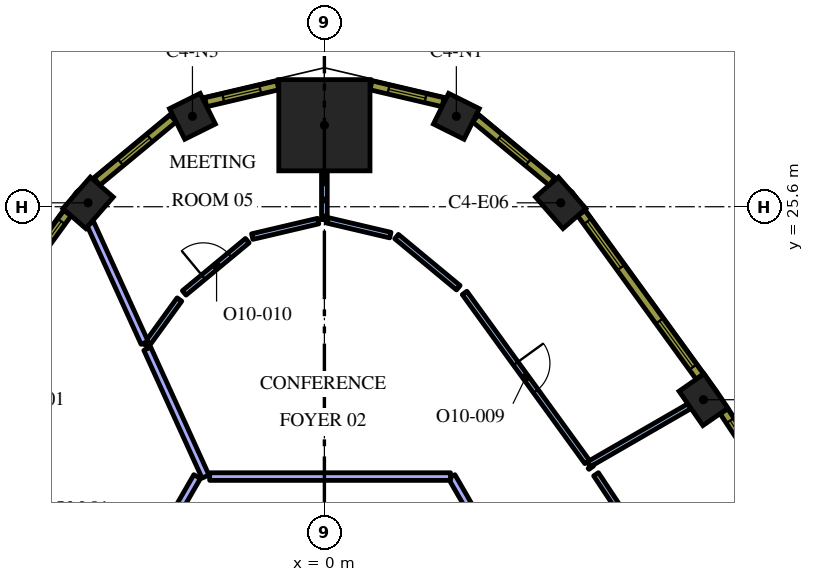
"""IFC4 building model, lengths in metres.
Left out: names, types, materials, properties, quantities, classifications, styles, units other than length and angle.
Written with IfcOpenShell. Run it as: python <this file> out.ifc"""

import sys

from ifc_helpers import new_model, si_unit, direction, frame, frame_2d, origin, origin_2d, place, context, subcontext, project, spatial, rectangle, extrude, element, fill, save


model = new_model("IFC4")
c1 = context("Model", 3, precision=1e-05, world=origin(), true_north=direction((0.0, 1.0)))
c2 = subcontext(c1, "Body", "Model", "MODEL_VIEW")
j1 = project(units=[si_unit("LENGTHUNIT", "METRE"), si_unit("PLANEANGLEUNIT", "RADIAN")], contexts=[c1])
p1 = place(None, origin())
s1 = spatial("IfcSite", under=j1, at=p1, CompositionType="ELEMENT")
p2 = place(p1, origin())
s2 = spatial("IfcBuilding", under=s1, at=p2, CompositionType="ELEMENT")
p3 = place(p2, frame((0.0, 0.0, 252.0)))
s3 = spatial("IfcBuildingStorey", under=s2, at=p3, CompositionType="ELEMENT", Elevation=252.0)
p4 = place(p3, frame((0.0, 27.744, 0.0), z_axis=(0.0, 0.0, 1.0), x_axis=(0.0, 1.0, 0.0)))
e1 = element("IfcColumn", 1, at=p4, inside=s3, PredefinedType="COLUMN", context=c2, shape_type="SweptSolid", body=[
    extrude(rectangle(XDim=2.4, YDim=2.4, at=origin_2d()), origin(), (0.0, 0.0, 1.0), 4.2),
])
for number, where, z_axis, x_axis in (
    (2, (9.975, 20.522, 0.0), (0.0, 0.0, 1.0), (-0.57, 0.822, 0.0)),
    (3, (6.219, 25.703, 0.0), (0.0, 0.0, 1.0), (-0.657, 0.754, 0.0)),
):
    element("IfcColumn", number, at=place(p3, frame(where, z_axis=z_axis, x_axis=x_axis)), inside=s3, PredefinedType="COLUMN", context=c2, shape_type="SweptSolid", body=[
        extrude(rectangle(XDim=1.1, YDim=0.8, at=origin_2d()), origin(), (0.0, 0.0, 1.0), 4.2),
    ])
for number, where, z_axis, x_axis in (
    (4, (3.472, 27.979, 0.0), (0.0, 0.0, 1.0), (-0.895, 0.445, 0.0)),
    (5, (-3.472, 27.979, 0.0), (0.0, 0.0, 1.0), (-0.895, -0.445, 0.0)),
):
    element("IfcColumn", number, at=place(p3, frame(where, z_axis=z_axis, x_axis=x_axis)), inside=s3, PredefinedType="COLUMN", context=c2, shape_type="SweptSolid", body=[
        extrude(rectangle(XDim=0.9, YDim=0.9, at=origin_2d()), origin(), (0.0, 0.0, 1.0), 4.2),
    ])
p5 = place(p3, frame((-6.219, 25.703, 0.0), z_axis=(0.0, 0.0, 1.0), x_axis=(-0.657250291216, -0.753672378886, 0.0)))
e6 = element("IfcColumn", 6, at=p5, inside=s3, PredefinedType="COLUMN", context=c2, shape_type="SweptSolid", body=[
    extrude(rectangle(XDim=1.1, YDim=0.8, at=origin_2d()), origin(), (0.0, 0.0, 1.0), 4.2),
])
p6 = place(p3, frame((6.958, 18.823, 0.0), z_axis=(0.0, 0.0, 1.0), x_axis=(0.866008752819, 0.500028839209, 0.0)))
e7 = element("IfcWall", 7, at=p6, inside=s3, PredefinedType="PARTITIONING", context=c2, shape_type="SweptSolid", body=[
    extrude(rectangle(XDim=3.058, YDim=0.15, at=frame_2d((1.529, 0.0))), origin(), (0.0, 0.0, 1.0), 3.4),
])
p7 = place(p3, frame((10.489, 13.526, 0.0), z_axis=(0.0, 0.0, 1.0), x_axis=(-0.552890023891, 0.833254235802, 0.0)))
e8 = element("IfcWall", 8, at=p7, inside=s3, PredefinedType="PARTITIONING", context=c2, shape_type="SweptSolid", body=[
    extrude(rectangle(XDim=6.042, YDim=0.15, at=frame_2d((3.021, 0.0))), origin(), (0.0, 0.0, 1.0), 3.4),
])
p8 = place(p3, frame((7.022, 18.734, 0.0), z_axis=(0.0, 0.0, 1.0), x_axis=(-0.585233084123, 0.810865116556, 0.0)))
e9 = element("IfcWall", 9, at=p8, inside=s3, PredefinedType="PARTITIONING", context=c2, shape_type="SweptSolid", body=[
    extrude(rectangle(XDim=0.035, YDim=0.15, at=frame_2d((0.017, 0.0))), origin(), (0.0, 0.0, 1.0), 3.4),
])
p9 = place(p3, frame((0.0, 25.261, 0.0), z_axis=(0.0, 0.0, 1.0), x_axis=(0.0, 1.0, 0.0)))
e10 = element("IfcWall", 10, at=p9, inside=s3, PredefinedType="PARTITIONING", context=c2, shape_type="SweptSolid", body=[
    extrude(rectangle(XDim=1.283, YDim=0.15, at=frame_2d((0.642, 0.0))), origin(), (0.0, 0.0, 1.0), 3.4),
])
p10 = place(p3, frame((3.689, 23.332, 0.0), z_axis=(0.0, 0.0, 1.0), x_axis=(0.587008354495, -0.809580874128, 0.0)))
e11 = element("IfcWall", 11, at=p10, inside=s3, PredefinedType="PARTITIONING", context=c2, shape_type="SweptSolid", body=[
    extrude(rectangle(XDim=5.493, YDim=0.15, at=frame_2d((2.747, 0.0))), origin(), (0.0, 0.0, 1.0), 3.4),
])
p11 = place(p10, frame((2.294, 0.0, 0.0)))
e12 = element("IfcOpeningElement", 12, at=p11, cuts=e11, PredefinedType="OPENING", context=c2, shape_type="SweptSolid", body=[
    extrude(rectangle(XDim=0.9, YDim=2.1, at=frame_2d((0.45, 1.05))), frame((0.0, 0.085, 0.0), z_axis=(0.0, -1.0, 0.0), x_axis=(1.0, 0.0, 0.0)), (0.0, 0.0, 1.0), 0.17),
])
p12 = place(p3, frame((3.524, 23.469, 0.0), z_axis=(0.0, 0.0, 1.0), x_axis=(-0.76998257631, 0.638064912199, 0.0)))
e13 = element("IfcWall", 13, at=p12, inside=s3, PredefinedType="PARTITIONING", context=c2, shape_type="SweptSolid", body=[
    extrude(rectangle(XDim=2.11, YDim=0.15, at=frame_2d((1.055, 0.0))), origin(), (0.0, 0.0, 1.0), 3.4),
])
p13 = place(p3, frame((1.735, 24.854, 0.0), z_axis=(0.0, 0.0, 1.0), x_axis=(-0.973544695081, 0.228496666669, 0.0)))
e14 = element("IfcWall", 14, at=p13, inside=s3, PredefinedType="PARTITIONING", context=c2, shape_type="SweptSolid", body=[
    extrude(rectangle(XDim=1.705, YDim=0.15, at=frame_2d((0.853, 0.0))), origin(), (0.0, 0.0, 1.0), 3.4),
])
p14 = place(p3, frame((-0.164, 25.222, 0.0), z_axis=(0.0, 0.0, 1.0), x_axis=(-0.973485388336, -0.228749204801, 0.0)))
e15 = element("IfcWall", 15, at=p14, inside=s3, PredefinedType="PARTITIONING", context=c2, shape_type="SweptSolid", body=[
    extrude(rectangle(XDim=1.782, YDim=0.15, at=frame_2d((0.891, 0.0))), origin(), (0.0, 0.0, 1.0), 3.4),
])
p15 = place(p3, frame((-3.689, 23.332, 0.0), z_axis=(0.0, 0.0, 1.0), x_axis=(0.769991356208, 0.63805431694, 0.0)))
e16 = element("IfcWall", 16, at=p15, inside=s3, PredefinedType="PARTITIONING", context=c2, shape_type="SweptSolid", body=[
    extrude(rectangle(XDim=2.156, YDim=0.15, at=frame_2d((1.078, 0.0))), origin(), (0.0, 0.0, 1.0), 3.4),
])
p16 = place(p15, frame((0.656, 0.0, 0.0)))
e17 = element("IfcOpeningElement", 17, at=p16, cuts=e16, PredefinedType="OPENING", context=c2, shape_type="SweptSolid", body=[
    extrude(rectangle(XDim=0.9, YDim=2.1, at=frame_2d((0.45, 1.05))), frame((0.0, 0.085, 0.0), z_axis=(0.0, -1.0, 0.0), x_axis=(1.0, 0.0, 0.0)), (0.0, 0.0, 1.0), 0.17),
])
p17 = place(p3, frame((-3.814, 23.158, 0.0), z_axis=(0.0, 0.0, 1.0), x_axis=(-0.58694359924, -0.809627822713, 0.0)))
e18 = element("IfcWall", 18, at=p17, inside=s3, PredefinedType="PARTITIONING", context=c2, shape_type="SweptSolid", body=[
    extrude(rectangle(XDim=1.502, YDim=0.15, at=frame_2d((0.751, 0.0))), origin(), (0.0, 0.0, 1.0), 3.4),
])
p18 = place(p3, frame((-4.732, 22.021, 0.0), z_axis=(0.0, 0.0, 1.0), x_axis=(-0.414330796432, 0.910126359979, 0.0)))
e19 = element("IfcWall", 19, at=p18, inside=s3, PredefinedType="PARTITIONING", context=c2, shape_type="SweptSolid", body=[
    extrude(rectangle(XDim=3.449, YDim=0.2, at=frame_2d((1.725, 0.0))), origin(), (0.0, 0.0, 1.0), 3.4),
])
p19 = place(p3, frame((-3.129, 18.5, 0.0), z_axis=(0.0, 0.0, 1.0), x_axis=(-0.414340331393, 0.910122019172, 0.0)))
e20 = element("IfcWall", 20, at=p19, inside=s3, PredefinedType="PARTITIONING", context=c2, shape_type="SweptSolid", body=[
    extrude(rectangle(XDim=3.696, YDim=0.2, at=frame_2d((1.848, 0.0))), origin(), (0.0, 0.0, 1.0), 3.4),
])
p20 = place(p3, frame((7.507, 11.297, 0.0), z_axis=(0.0, 0.0, 1.0), x_axis=(-0.499987561347, 0.866032585125, 0.0)))
e21 = element("IfcWall", 21, at=p20, inside=s3, PredefinedType="PARTITIONING", context=c2, shape_type="SweptSolid", body=[
    extrude(rectangle(XDim=8.317, YDim=0.2, at=frame_2d((4.159, 0.0))), origin(), (0.0, 0.0, 1.0), 3.4),
])
p21 = place(p20, frame((3.7, 0.0, 0.0)))
e22 = element("IfcOpeningElement", 22, at=p21, cuts=e21, PredefinedType="OPENING", context=c2, shape_type="SweptSolid", body=[
    extrude(rectangle(XDim=1.0, YDim=2.1, at=frame_2d((0.5, 1.05))), frame((0.0, 0.11, 0.0), z_axis=(0.0, -1.0, 0.0), x_axis=(1.0, 0.0, 0.0)), (0.0, 0.0, 1.0), 0.22),
])
p22 = place(p3, frame((3.319, 18.5, 0.0), z_axis=(0.0, 0.0, 1.0), x_axis=(-1.0, 0.0, 0.0)))
e23 = element("IfcWall", 23, at=p22, inside=s3, PredefinedType="PARTITIONING", context=c2, shape_type="SweptSolid", body=[
    extrude(rectangle(XDim=6.338, YDim=0.2, at=frame_2d((3.169, 0.0))), origin(), (0.0, 0.0, 1.0), 3.4),
])
p23 = place(p3, frame((-3.349, 18.5, 0.0), z_axis=(0.0, 0.0, 1.0), x_axis=(-0.499987561347, -0.866032585125, 0.0)))
e24 = element("IfcWall", 24, at=p23, inside=s3, PredefinedType="PARTITIONING", context=c2, shape_type="SweptSolid", body=[
    extrude(rectangle(XDim=8.317, YDim=0.2, at=frame_2d((4.159, 0.0))), origin(), (0.0, 0.0, 1.0), 3.4),
])
p24 = place(p3, frame((13.442, 15.803, 0.0), z_axis=(0.0, 0.0, 1.0), x_axis=(-0.552901821755, 0.833246407433, 0.0)))
e25 = element("IfcWall", 25, at=p24, inside=s3, PredefinedType="SOLIDWALL", context=c2, shape_type="SweptSolid", body=[
    extrude(rectangle(XDim=5.298, YDim=0.24, at=frame_2d((2.649, 0.0))), origin(), (0.0, 0.0, 1.0), 3.9),
])
p25 = place(p24, frame((0.295, 0.0, 0.9)))
e26 = element("IfcOpeningElement", 26, at=p25, cuts=e25, PredefinedType="OPENING", context=c2, shape_type="SweptSolid", body=[
    extrude(rectangle(XDim=1.5, YDim=2.55, at=frame_2d((0.75, 1.275))), frame((0.0, 0.13, 0.0), z_axis=(0.0, -1.0, 0.0), x_axis=(1.0, 0.0, 0.0)), (0.0, 0.0, 1.0), 0.26),
])
p26 = place(p24, frame((3.504, 0.0, 0.9)))
e27 = element("IfcOpeningElement", 27, at=p26, cuts=e25, PredefinedType="OPENING", context=c2, shape_type="SweptSolid", body=[
    extrude(rectangle(XDim=1.5, YDim=2.55, at=frame_2d((0.75, 1.275))), frame((0.0, 0.13, 0.0), z_axis=(0.0, -1.0, 0.0), x_axis=(1.0, 0.0, 0.0)), (0.0, 0.0, 1.0), 0.26),
])
p27 = place(p3, frame((9.878, 21.132, 0.0), z_axis=(0.0, 0.0, 1.0), x_axis=(-0.586998456641, 0.80958805074, 0.0)))
e28 = element("IfcWall", 28, at=p27, inside=s3, PredefinedType="SOLIDWALL", context=c2, shape_type="SweptSolid", body=[
    extrude(rectangle(XDim=5.311, YDim=0.24, at=frame_2d((2.655, 0.0))), origin(), (0.0, 0.0, 1.0), 3.9),
])
p28 = place(p27, frame((0.306, 0.0, 0.9)))
e29 = element("IfcOpeningElement", 29, at=p28, cuts=e28, PredefinedType="OPENING", context=c2, shape_type="SweptSolid", body=[
    extrude(rectangle(XDim=1.5, YDim=2.55, at=frame_2d((0.75, 1.275))), frame((0.0, 0.13, 0.0), z_axis=(0.0, -1.0, 0.0), x_axis=(1.0, 0.0, 0.0)), (0.0, 0.0, 1.0), 0.26),
])
p29 = place(p27, frame((3.539, 0.0, 0.9)))
e30 = element("IfcOpeningElement", 30, at=p29, cuts=e28, PredefinedType="OPENING", context=c2, shape_type="SweptSolid", body=[
    extrude(rectangle(XDim=1.5, YDim=2.55, at=frame_2d((0.75, 1.275))), frame((0.0, 0.13, 0.0), z_axis=(0.0, -1.0, 0.0), x_axis=(1.0, 0.0, 0.0)), (0.0, 0.0, 1.0), 0.26),
])
p30 = place(p3, frame((5.987, 26.259, 0.0), z_axis=(0.0, 0.0, 1.0), x_axis=(-0.769990037733, 0.638055908045, 0.0)))
e31 = element("IfcWall", 31, at=p30, inside=s3, PredefinedType="SOLIDWALL", context=c2, shape_type="SweptSolid", body=[
    extrude(rectangle(XDim=2.609, YDim=0.24, at=frame_2d((1.305, 0.0))), origin(), (0.0, 0.0, 1.0), 3.9),
])
p31 = place(p30, frame((0.805, 0.0, 0.9)))
e32 = element("IfcOpeningElement", 32, at=p31, cuts=e31, PredefinedType="OPENING", context=c2, shape_type="SweptSolid", body=[
    extrude(rectangle(XDim=1.0, YDim=2.55, at=frame_2d((0.5, 1.275))), frame((0.0, 0.13, 0.0), z_axis=(0.0, -1.0, 0.0), x_axis=(1.0, 0.0, 0.0)), (0.0, 0.0, 1.0), 0.26),
])
p32 = place(p3, frame((3.123, 28.349, 0.0), z_axis=(0.0, 0.0, 1.0), x_axis=(-0.973515706272, 0.228620142686, 0.0)))
e33 = element("IfcWall", 33, at=p32, inside=s3, PredefinedType="SOLIDWALL", context=c2, shape_type="SweptSolid", body=[
    extrude(rectangle(XDim=1.948, YDim=0.24, at=frame_2d((0.974, 0.0))), origin(), (0.0, 0.0, 1.0), 3.9),
])
p33 = place(p32, frame((0.474, 0.0, 0.9)))
e34 = element("IfcOpeningElement", 34, at=p33, cuts=e33, PredefinedType="OPENING", context=c2, shape_type="SweptSolid", body=[
    extrude(rectangle(XDim=1.0, YDim=2.55, at=frame_2d((0.5, 1.275))), frame((0.0, 0.13, 0.0), z_axis=(0.0, -1.0, 0.0), x_axis=(1.0, 0.0, 0.0)), (0.0, 0.0, 1.0), 0.26),
])
p34 = place(p3, frame((-1.227, 28.794, 0.0), z_axis=(0.0, 0.0, 1.0), x_axis=(-0.973515706272, -0.228620142686, 0.0)))
e35 = element("IfcWall", 35, at=p34, inside=s3, PredefinedType="SOLIDWALL", context=c2, shape_type="SweptSolid", body=[
    extrude(rectangle(XDim=1.948, YDim=0.24, at=frame_2d((0.974, 0.0))), origin(), (0.0, 0.0, 1.0), 3.9),
])
p35 = place(p34, frame((0.474, 0.0, 0.9)))
e36 = element("IfcOpeningElement", 36, at=p35, cuts=e35, PredefinedType="OPENING", context=c2, shape_type="SweptSolid", body=[
    extrude(rectangle(XDim=1.0, YDim=2.55, at=frame_2d((0.5, 1.275))), frame((0.0, 0.13, 0.0), z_axis=(0.0, -1.0, 0.0), x_axis=(1.0, 0.0, 0.0)), (0.0, 0.0, 1.0), 0.26),
])
p36 = place(p3, frame((-3.978, 27.924, 0.0), z_axis=(0.0, 0.0, 1.0), x_axis=(-0.769990037733, -0.638055908045, 0.0)))
e37 = element("IfcWall", 37, at=p36, inside=s3, PredefinedType="SOLIDWALL", context=c2, shape_type="SweptSolid", body=[
    extrude(rectangle(XDim=2.609, YDim=0.24, at=frame_2d((1.305, 0.0))), origin(), (0.0, 0.0, 1.0), 3.9),
])
p37 = place(p36, frame((0.805, 0.0, 0.9)))
e38 = element("IfcOpeningElement", 38, at=p37, cuts=e37, PredefinedType="OPENING", context=c2, shape_type="SweptSolid", body=[
    extrude(rectangle(XDim=1.0, YDim=2.55, at=frame_2d((0.5, 1.275))), frame((0.0, 0.13, 0.0), z_axis=(0.0, -1.0, 0.0), x_axis=(1.0, 0.0, 0.0)), (0.0, 0.0, 1.0), 0.26),
])
p38 = place(p3, frame((-6.761, 25.432, 0.0), z_axis=(0.0, 0.0, 1.0), x_axis=(-0.586998456641, -0.80958805074, 0.0)))
e39 = element("IfcWall", 39, at=p38, inside=s3, PredefinedType="SOLIDWALL", context=c2, shape_type="SweptSolid", body=[
    extrude(rectangle(XDim=5.311, YDim=0.24, at=frame_2d((2.655, 0.0))), origin(), (0.0, 0.0, 1.0), 3.9),
])
p39 = place(p38, frame((0.271, 0.0, 0.9)))
e40 = element("IfcOpeningElement", 40, at=p39, cuts=e39, PredefinedType="OPENING", context=c2, shape_type="SweptSolid", body=[
    extrude(rectangle(XDim=1.5, YDim=2.55, at=frame_2d((0.75, 1.275))), frame((0.0, 0.13, 0.0), z_axis=(0.0, -1.0, 0.0), x_axis=(1.0, 0.0, 0.0)), (0.0, 0.0, 1.0), 0.26),
])
p40 = place(p38, frame((3.504, 0.0, 0.9)))
e41 = element("IfcOpeningElement", 41, at=p40, cuts=e39, PredefinedType="OPENING", context=c2, shape_type="SweptSolid", body=[
    extrude(rectangle(XDim=1.5, YDim=2.55, at=frame_2d((0.75, 1.275))), frame((0.0, 0.13, 0.0), z_axis=(0.0, -1.0, 0.0), x_axis=(1.0, 0.0, 0.0)), (0.0, 0.0, 1.0), 0.26),
])
p41 = place(p11, origin())
e42 = element("IfcDoor", 42, at=p41, inside=s3, OperationType="SINGLE_SWING_LEFT", PredefinedType="DOOR", context=c2, shape_type="SweptSolid", body=[
    extrude(rectangle(XDim=0.9, YDim=2.1, at=frame_2d((0.45, 1.05))), frame((0.0, 0.025, 0.0), z_axis=(0.0, -1.0, 0.0), x_axis=(1.0, 0.0, 0.0)), (0.0, 0.0, 1.0), 0.05),
])
fill(e12, e42)
p42 = place(p16, origin())
e43 = element("IfcDoor", 43, at=p42, inside=s3, OperationType="SINGLE_SWING_RIGHT", PredefinedType="DOOR", context=c2, shape_type="SweptSolid", body=[
    extrude(rectangle(XDim=0.9, YDim=2.1, at=frame_2d((0.45, 1.05))), frame((0.0, 0.025, 0.0), z_axis=(0.0, -1.0, 0.0), x_axis=(1.0, 0.0, 0.0)), (0.0, 0.0, 1.0), 0.05),
])
fill(e17, e43)
p43 = place(p26, origin())
e44 = element("IfcWindow", 44, at=p43, inside=s3, PartitioningType="SINGLE_PANEL", PredefinedType="WINDOW", context=c2, shape_type="SweptSolid", body=[
    extrude(rectangle(XDim=1.5, YDim=2.55, at=frame_2d((0.75, 1.275))), frame((0.0, 0.04, 0.0), z_axis=(0.0, -1.0, 0.0), x_axis=(1.0, 0.0, 0.0)), (0.0, 0.0, 1.0), 0.06),
])
fill(e27, e44)
p44 = place(p28, origin())
e45 = element("IfcWindow", 45, at=p44, inside=s3, PartitioningType="SINGLE_PANEL", PredefinedType="WINDOW", context=c2, shape_type="SweptSolid", body=[
    extrude(rectangle(XDim=1.5, YDim=2.55, at=frame_2d((0.75, 1.275))), frame((0.0, 0.04, 0.0), z_axis=(0.0, -1.0, 0.0), x_axis=(1.0, 0.0, 0.0)), (0.0, 0.0, 1.0), 0.06),
])
fill(e29, e45)
p45 = place(p29, origin())
e46 = element("IfcWindow", 46, at=p45, inside=s3, PartitioningType="SINGLE_PANEL", PredefinedType="WINDOW", context=c2, shape_type="SweptSolid", body=[
    extrude(rectangle(XDim=1.5, YDim=2.55, at=frame_2d((0.75, 1.275))), frame((0.0, 0.04, 0.0), z_axis=(0.0, -1.0, 0.0), x_axis=(1.0, 0.0, 0.0)), (0.0, 0.0, 1.0), 0.06),
])
fill(e30, e46)
p46 = place(p31, origin())
e47 = element("IfcWindow", 47, at=p46, inside=s3, PartitioningType="SINGLE_PANEL", PredefinedType="WINDOW", context=c2, shape_type="SweptSolid", body=[
    extrude(rectangle(XDim=1.0, YDim=2.55, at=frame_2d((0.5, 1.275))), frame((0.0, 0.04, 0.0), z_axis=(0.0, -1.0, 0.0), x_axis=(1.0, 0.0, 0.0)), (0.0, 0.0, 1.0), 0.06),
])
fill(e32, e47)
p47 = place(p33, origin())
e48 = element("IfcWindow", 48, at=p47, inside=s3, PartitioningType="SINGLE_PANEL", PredefinedType="WINDOW", context=c2, shape_type="SweptSolid", body=[
    extrude(rectangle(XDim=1.0, YDim=2.55, at=frame_2d((0.5, 1.275))), frame((0.0, 0.04, 0.0), z_axis=(0.0, -1.0, 0.0), x_axis=(1.0, 0.0, 0.0)), (0.0, 0.0, 1.0), 0.06),
])
fill(e34, e48)
p48 = place(p35, origin())
e49 = element("IfcWindow", 49, at=p48, inside=s3, PartitioningType="SINGLE_PANEL", PredefinedType="WINDOW", context=c2, shape_type="SweptSolid", body=[
    extrude(rectangle(XDim=1.0, YDim=2.55, at=frame_2d((0.5, 1.275))), frame((0.0, 0.04, 0.0), z_axis=(0.0, -1.0, 0.0), x_axis=(1.0, 0.0, 0.0)), (0.0, 0.0, 1.0), 0.06),
])
fill(e36, e49)
p49 = place(p37, origin())
e50 = element("IfcWindow", 50, at=p49, inside=s3, PartitioningType="SINGLE_PANEL", PredefinedType="WINDOW", context=c2, shape_type="SweptSolid", body=[
    extrude(rectangle(XDim=1.0, YDim=2.55, at=frame_2d((0.5, 1.275))), frame((0.0, 0.04, 0.0), z_axis=(0.0, -1.0, 0.0), x_axis=(1.0, 0.0, 0.0)), (0.0, 0.0, 1.0), 0.06),
])
fill(e38, e50)
p50 = place(p39, origin())
e51 = element("IfcWindow", 51, at=p50, inside=s3, PartitioningType="SINGLE_PANEL", PredefinedType="WINDOW", context=c2, shape_type="SweptSolid", body=[
    extrude(rectangle(XDim=1.5, YDim=2.55, at=frame_2d((0.75, 1.275))), frame((0.0, 0.04, 0.0), z_axis=(0.0, -1.0, 0.0), x_axis=(1.0, 0.0, 0.0)), (0.0, 0.0, 1.0), 0.06),
])
fill(e40, e51)
save(model, sys.argv[1])
